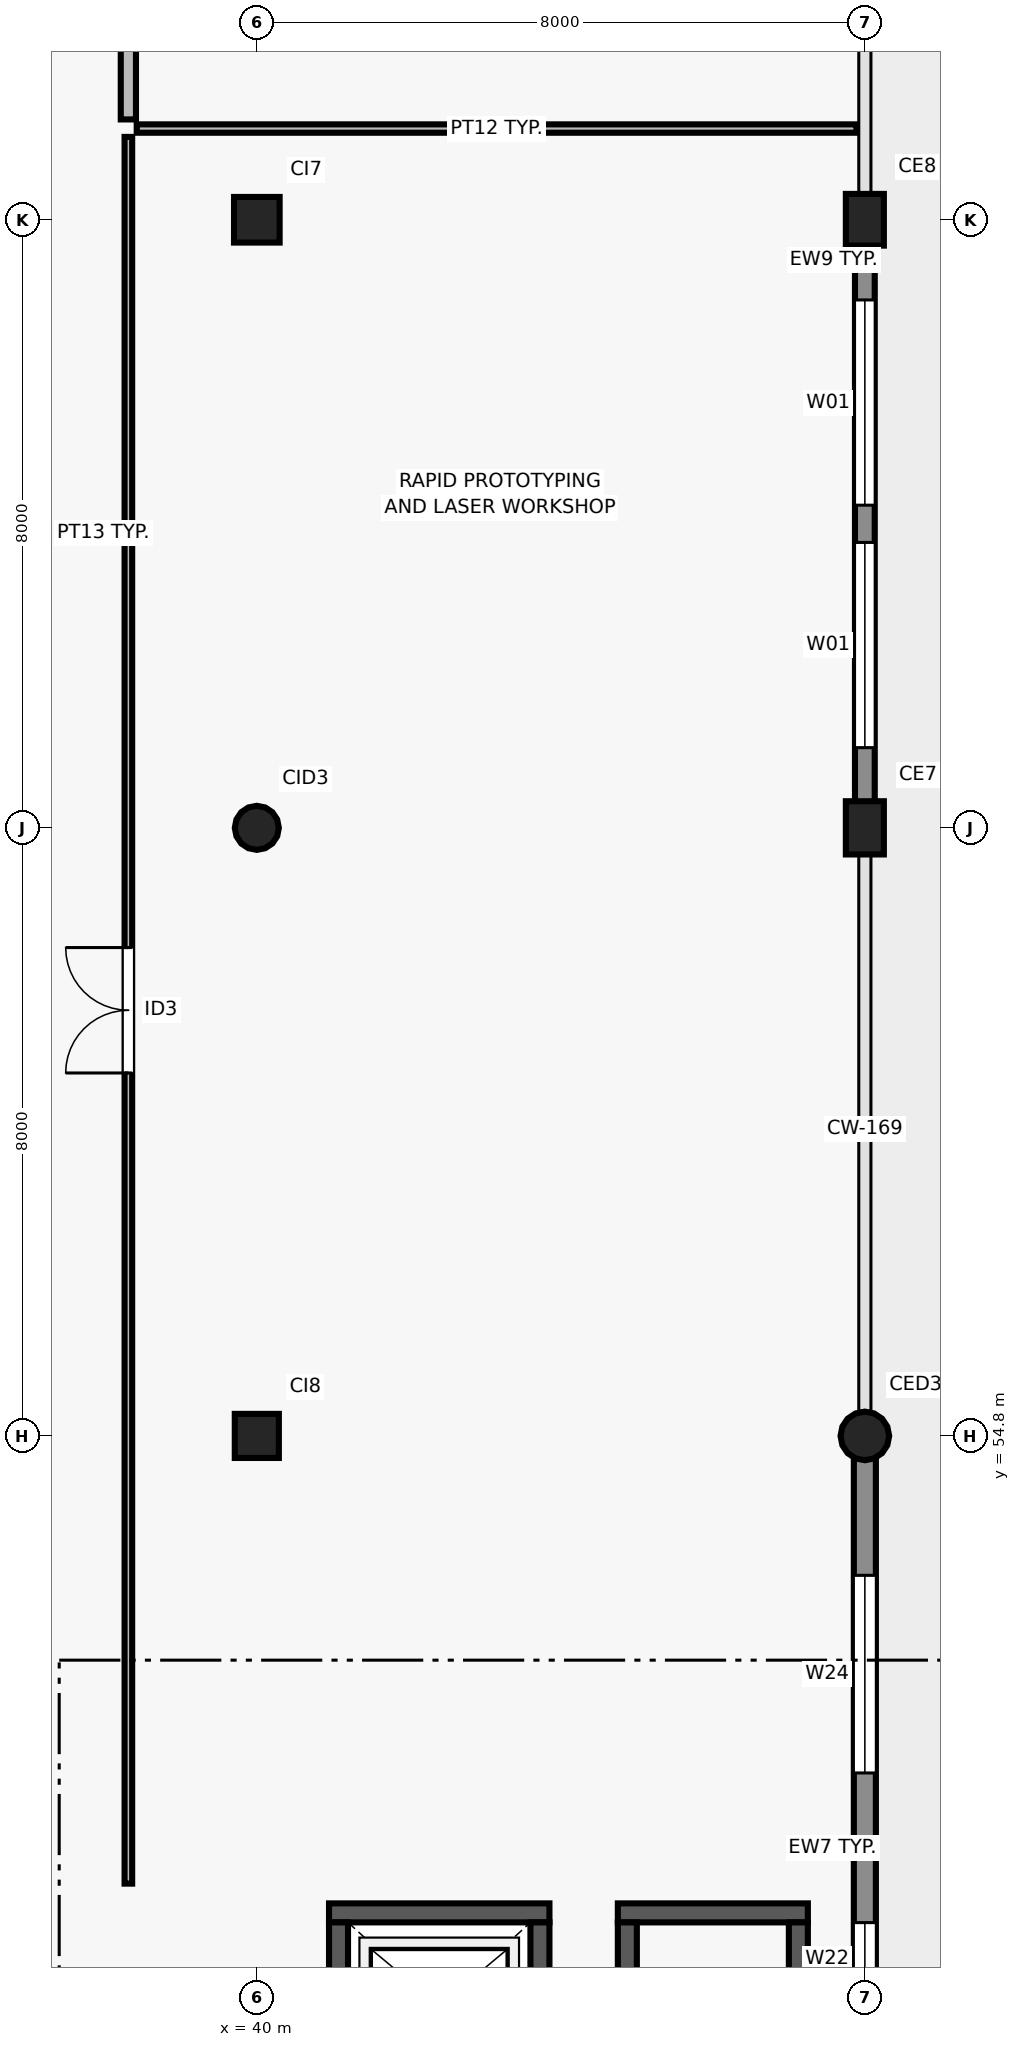
"""IFC4 building model, lengths in metres.
Left out: names, types, materials, properties, quantities, classifications, styles, units other than length and angle.
Written with IfcOpenShell. Run it as: python <this file> out.ifc"""

import sys

from ifc_helpers import new_model, si_unit, direction, frame, frame_2d, origin, origin_2d, place, context, subcontext, project, spatial, rectangle, circle, extrude, element, fill, save


model = new_model("IFC4")
c1 = context("Model", 3, precision=1e-05, world=origin(), true_north=direction((0.0, 1.0)))
c2 = subcontext(c1, "Body", "Model", "MODEL_VIEW")
j1 = project(units=[si_unit("LENGTHUNIT", "METRE"), si_unit("PLANEANGLEUNIT", "RADIAN")], contexts=[c1])
p1 = place(None, origin())
s1 = spatial("IfcSite", under=j1, at=p1, CompositionType="ELEMENT")
p2 = place(p1, origin())
s2 = spatial("IfcBuilding", under=s1, at=p2, CompositionType="ELEMENT")
p3 = place(p2, frame((0.0, 0.0, 13.2)))
s3 = spatial("IfcBuildingStorey", under=s2, at=p3, CompositionType="ELEMENT", Elevation=13.2)
p4 = place(p3, frame((40.0, 54.8, 0.0), z_axis=(0.0, 0.0, 1.0), x_axis=(1.0, 0.0, 0.0)))
e1 = element("IfcColumn", 1, at=p4, inside=s3, PredefinedType="COLUMN", context=c2, shape_type="SweptSolid", body=[
    extrude(rectangle(XDim=0.58, YDim=0.58, at=origin_2d()), origin(), (0.0, 0.0, 1.0), 4.2),
])
p5 = place(p3, frame((40.0, 62.8, 0.0), z_axis=(0.0, 0.0, 1.0), x_axis=(1.0, 0.0, 0.0)))
e2 = element("IfcColumn", 2, at=p5, inside=s3, PredefinedType="COLUMN", context=c2, shape_type="SweptSolid", body=[
    extrude(circle(Radius=0.29, at=origin_2d()), origin(), (0.0, 0.0, 1.0), 4.2),
])
p6 = place(p3, frame((40.0, 70.8, 0.0), z_axis=(0.0, 0.0, 1.0), x_axis=(1.0, 0.0, 0.0)))
e3 = element("IfcColumn", 3, at=p6, inside=s3, PredefinedType="COLUMN", context=c2, shape_type="SweptSolid", body=[
    extrude(rectangle(XDim=0.6, YDim=0.6, at=origin_2d()), origin(), (0.0, 0.0, 1.0), 4.2),
])
p7 = place(p3, frame((48.0, 54.8, 0.0), z_axis=(0.0, 0.0, 1.0), x_axis=(1.0, 0.0, 0.0)))
e4 = element("IfcColumn", 4, at=p7, inside=s3, PredefinedType="COLUMN", context=c2, shape_type="SweptSolid", body=[
    extrude(circle(Radius=0.32, at=origin_2d()), origin(), (0.0, 0.0, 1.0), 4.2),
])
p8 = place(p3, frame((48.0, 62.8, 0.0), z_axis=(0.0, 0.0, 1.0), x_axis=(1.0, 0.0, 0.0)))
e5 = element("IfcColumn", 5, at=p8, inside=s3, PredefinedType="COLUMN", context=c2, shape_type="SweptSolid", body=[
    extrude(rectangle(XDim=0.7, YDim=0.5, at=origin_2d()), origin(), (0.0, 0.0, 1.0), 4.2),
])
p9 = place(p3, frame((48.0, 70.8, 0.0), z_axis=(0.0, 0.0, 1.0), x_axis=(1.0, 0.0, 0.0)))
e6 = element("IfcColumn", 6, at=p9, inside=s3, PredefinedType="COLUMN", context=c2, shape_type="SweptSolid", body=[
    extrude(rectangle(XDim=0.68, YDim=0.5, at=origin_2d()), origin(), (0.0, 0.0, 1.0), 4.2),
])
p10 = place(p3, frame((48.0, 47.045, 0.0), z_axis=(0.0, 0.0, 1.0), x_axis=(0.0, 1.0, 0.0)))
e7 = element("IfcWall", 7, at=p10, inside=s3, PredefinedType="SOLIDWALL", context=c2, shape_type="SweptSolid", body=[
    extrude(rectangle(XDim=7.486, YDim=0.29, at=frame_2d((3.743, 0.0))), origin(), (0.0, 0.0, 1.0), 3.52),
])
p11 = place(p10, frame((0.402, 0.0, 0.9)))
e8 = element("IfcOpeningElement", 8, at=p11, cuts=e7, PredefinedType="OPENING", context=c2, shape_type="SweptSolid", body=[
    extrude(rectangle(XDim=0.95, YDim=1.25, at=frame_2d((0.475, 0.625))), frame((0.0, 0.155, 0.0), z_axis=(0.0, -1.0, 0.0), x_axis=(1.0, 0.0, 0.0)), (0.0, 0.0, 1.0), 0.31),
])
p12 = place(p10, frame((3.321, 0.0, 0.9)))
e9 = element("IfcOpeningElement", 9, at=p12, cuts=e7, PredefinedType="OPENING", context=c2, shape_type="SweptSolid", body=[
    extrude(rectangle(XDim=2.6, YDim=1.65, at=frame_2d((1.3, 0.825))), frame((0.0, 0.155, 0.0), z_axis=(0.0, -1.0, 0.0), x_axis=(1.0, 0.0, 0.0)), (0.0, 0.0, 1.0), 0.31),
])
p13 = place(p3, frame((48.0, 63.045, 0.0), z_axis=(0.0, 0.0, 1.0), x_axis=(0.0, 1.0, 0.0)))
e10 = element("IfcWall", 10, at=p13, inside=s3, PredefinedType="SOLIDWALL", context=c2, shape_type="SweptSolid", body=[
    extrude(rectangle(XDim=7.51, YDim=0.26, at=frame_2d((3.755, 0.0))), origin(), (0.0, 0.0, 1.0), 3.38),
])
p14 = place(p13, frame((0.81, 0.0, 0.9)))
e11 = element("IfcOpeningElement", 11, at=p14, cuts=e10, PredefinedType="OPENING", context=c2, shape_type="SweptSolid", body=[
    extrude(rectangle(XDim=2.7, YDim=1.8, at=frame_2d((1.35, 0.9))), frame((0.0, 0.14, 0.0), z_axis=(0.0, -1.0, 0.0), x_axis=(1.0, 0.0, 0.0)), (0.0, 0.0, 1.0), 0.28),
])
p15 = place(p13, frame((4.0, 0.0, 0.9)))
e12 = element("IfcOpeningElement", 12, at=p15, cuts=e10, PredefinedType="OPENING", context=c2, shape_type="SweptSolid", body=[
    extrude(rectangle(XDim=2.7, YDim=1.8, at=frame_2d((1.35, 0.9))), frame((0.0, 0.14, 0.0), z_axis=(0.0, -1.0, 0.0), x_axis=(1.0, 0.0, 0.0)), (0.0, 0.0, 1.0), 0.28),
])
p16 = place(p3, frame((40.95, 48.525, 0.0), z_axis=(0.0, 0.0, 1.0), x_axis=(1.0, 0.0, 0.0)))
e13 = element("IfcWall", 13, at=p16, inside=s3, PredefinedType="SHEAR", context=c2, shape_type="SweptSolid", body=[
    extrude(rectangle(XDim=2.9, YDim=0.25, at=frame_2d((1.45, 0.0))), origin(), (0.0, 0.0, 1.0), 3.92),
])
for number, where, z_axis, x_axis in (
    (14, (41.075, 46.2, 0.0), (0.0, 0.0, 1.0), (0.0, 1.0, 0.0)),
    (15, (43.725, 46.2, 0.0), (0.0, 0.0, 1.0), (0.0, 1.0, 0.0)),
):
    element("IfcWall", number, at=place(p3, frame(where, z_axis=z_axis, x_axis=x_axis)), inside=s3, PredefinedType="SHEAR", context=c2, shape_type="SweptSolid", body=[
        extrude(rectangle(XDim=2.2, YDim=0.25, at=frame_2d((1.1, 0.0))), origin(), (0.0, 0.0, 1.0), 3.92),
    ])
p17 = place(p3, frame((44.75, 48.525, 0.0), z_axis=(0.0, 0.0, 1.0), x_axis=(1.0, 0.0, 0.0)))
e16 = element("IfcWall", 16, at=p17, inside=s3, PredefinedType="SHEAR", context=c2, shape_type="SweptSolid", body=[
    extrude(rectangle(XDim=2.5, YDim=0.25, at=frame_2d((1.25, 0.0))), origin(), (0.0, 0.0, 1.0), 3.92),
])
for number, where, z_axis, x_axis in (
    (17, (44.875, 46.2, 0.0), (0.0, 0.0, 1.0), (0.0, 1.0, 0.0)),
    (18, (47.125, 46.2, 0.0), (0.0, 0.0, 1.0), (0.0, 1.0, 0.0)),
):
    element("IfcWall", number, at=place(p3, frame(where, z_axis=z_axis, x_axis=x_axis)), inside=s3, PredefinedType="SHEAR", context=c2, shape_type="SweptSolid", body=[
        extrude(rectangle(XDim=2.2, YDim=0.25, at=frame_2d((1.1, 0.0))), origin(), (0.0, 0.0, 1.0), 3.92),
    ])
p18 = place(p3, frame((38.42, 72.0, 0.0), z_axis=(0.0, 0.0, 1.0), x_axis=(1.0, 0.0, 0.0)))
e19 = element("IfcWall", 19, at=p18, inside=s3, PredefinedType="PARTITIONING", context=c2, shape_type="SweptSolid", body=[
    extrude(rectangle(XDim=9.47, YDim=0.11, at=frame_2d((4.735, 0.0))), origin(), (0.0, 0.0, 1.0), 3.9),
])
p19 = place(p3, frame((38.31, 48.91, 0.0), z_axis=(0.0, 0.0, 1.0), x_axis=(0.0, 1.0, 0.0)))
e20 = element("IfcWall", 20, at=p19, inside=s3, PredefinedType="PARTITIONING", context=c2, shape_type="SweptSolid", body=[
    extrude(rectangle(XDim=22.98, YDim=0.1, at=frame_2d((11.49, 0.0))), origin(), (0.0, 0.0, 1.0), 3.9),
])
p20 = place(p19, frame((10.665, 0.0, 0.0)))
e21 = element("IfcOpeningElement", 21, at=p20, cuts=e20, PredefinedType="OPENING", context=c2, shape_type="SweptSolid", body=[
    extrude(rectangle(XDim=1.65, YDim=2.3, at=frame_2d((0.825, 1.15))), frame((0.0, 0.06, 0.0), z_axis=(0.0, -1.0, 0.0), x_axis=(1.0, 0.0, 0.0)), (0.0, 0.0, 1.0), 0.12),
])
p21 = place(p3, frame((38.31, 72.12, 0.0), z_axis=(0.0, 0.0, 1.0), x_axis=(0.0, 1.0, 0.0)))
e22 = element("IfcWall", 22, at=p21, inside=s3, PredefinedType="SOLIDWALL", context=c2, shape_type="SweptSolid", body=[
    extrude(rectangle(XDim=21.77, YDim=0.2, at=frame_2d((10.885, 0.0))), origin(), (0.0, 0.0, 1.0), 3.9),
])
p22 = place(p21, frame((10.245, 0.0, 0.0)))
e23 = element("IfcOpeningElement", 23, at=p22, cuts=e22, PredefinedType="OPENING", context=c2, shape_type="SweptSolid", body=[
    extrude(rectangle(XDim=1.28, YDim=2.2, at=frame_2d((0.64, 1.1))), frame((0.0, 0.11, 0.0), z_axis=(0.0, -1.0, 0.0), x_axis=(1.0, 0.0, 0.0)), (0.0, 0.0, 1.0), 0.22),
])
p23 = place(p11, origin())
e24 = element("IfcWindow", 24, at=p23, inside=s3, PartitioningType="SINGLE_PANEL", PredefinedType="WINDOW", context=c2, shape_type="SweptSolid", body=[
    extrude(rectangle(XDim=0.95, YDim=1.25, at=frame_2d((0.475, 0.625))), frame((0.0, 0.03, 0.0), z_axis=(0.0, -1.0, 0.0), x_axis=(1.0, 0.0, 0.0)), (0.0, 0.0, 1.0), 0.06),
])
fill(e8, e24)
p24 = place(p12, origin())
e25 = element("IfcWindow", 25, at=p24, inside=s3, PartitioningType="SINGLE_PANEL", PredefinedType="WINDOW", context=c2, shape_type="SweptSolid", body=[
    extrude(rectangle(XDim=2.6, YDim=1.65, at=frame_2d((1.3, 0.825))), frame((0.0, 0.03, 0.0), z_axis=(0.0, -1.0, 0.0), x_axis=(1.0, 0.0, 0.0)), (0.0, 0.0, 1.0), 0.06),
])
fill(e9, e25)
p25 = place(p14, origin())
e26 = element("IfcWindow", 26, at=p25, inside=s3, PartitioningType="SINGLE_PANEL", PredefinedType="WINDOW", context=c2, shape_type="SweptSolid", body=[
    extrude(rectangle(XDim=2.7, YDim=1.8, at=frame_2d((1.35, 0.9))), frame((0.0, 0.03, 0.0), z_axis=(0.0, -1.0, 0.0), x_axis=(1.0, 0.0, 0.0)), (0.0, 0.0, 1.0), 0.06),
])
fill(e11, e26)
p26 = place(p15, origin())
e27 = element("IfcWindow", 27, at=p26, inside=s3, PartitioningType="SINGLE_PANEL", PredefinedType="WINDOW", context=c2, shape_type="SweptSolid", body=[
    extrude(rectangle(XDim=2.7, YDim=1.8, at=frame_2d((1.35, 0.9))), frame((0.0, 0.03, 0.0), z_axis=(0.0, -1.0, 0.0), x_axis=(1.0, 0.0, 0.0)), (0.0, 0.0, 1.0), 0.06),
])
fill(e12, e27)
p27 = place(p20, origin())
e28 = element("IfcDoor", 28, at=p27, inside=s3, OperationType="DOUBLE_DOOR_SINGLE_SWING", PredefinedType="DOOR", context=c2, shape_type="SweptSolid", body=[
    extrude(rectangle(XDim=1.65, YDim=2.3, at=frame_2d((0.825, 1.15))), frame((0.0, 0.025, 0.0), z_axis=(0.0, -1.0, 0.0), x_axis=(1.0, 0.0, 0.0)), (0.0, 0.0, 1.0), 0.05),
])
fill(e21, e28)
save(model, sys.argv[1])
